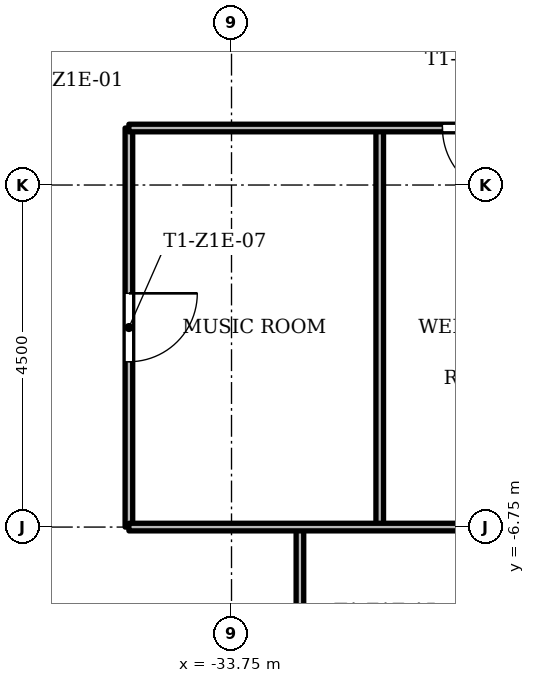
"""IFC4 building model, lengths in metres.
Left out: names, types, materials, properties, quantities, classifications, styles, units other than length and angle.
Written with IfcOpenShell. Run it as: python <this file> out.ifc"""

import sys

from ifc_helpers import new_model, si_unit, direction, frame, frame_2d, origin, place, context, subcontext, project, spatial, rectangle, extrude, element, fill, save


model = new_model("IFC4")
c1 = context("Model", 3, precision=1e-05, world=origin(), true_north=direction((0.0, 1.0)))
c2 = subcontext(c1, "Body", "Model", "MODEL_VIEW")
j1 = project(units=[si_unit("LENGTHUNIT", "METRE"), si_unit("PLANEANGLEUNIT", "RADIAN")], contexts=[c1])
p1 = place(None, origin())
s1 = spatial("IfcSite", under=j1, at=p1, CompositionType="ELEMENT")
p2 = place(p1, origin())
s2 = spatial("IfcBuilding", under=s1, at=p2, CompositionType="ELEMENT")
p3 = place(p2, frame((0.0, 0.0, 65.3)))
s3 = spatial("IfcBuildingStorey", under=s2, at=p3, CompositionType="ELEMENT", Elevation=65.3)
p4 = place(p3, frame((-35.1, -6.75, 0.0), z_axis=(0.0, 0.0, 1.0), x_axis=(0.0, 1.0, 0.0)))
e1 = element("IfcWall", 1, at=p4, inside=s3, PredefinedType="PARTITIONING", context=c2, shape_type="SweptSolid", body=[
    extrude(rectangle(XDim=5.25, YDim=0.1, at=frame_2d((2.625, 0.0))), origin(), (0.0, 0.0, 1.0), 3.0),
])
p5 = place(p4, frame((2.175, 0.0, 0.0)))
e2 = element("IfcOpeningElement", 2, at=p5, cuts=e1, PredefinedType="OPENING", context=c2, shape_type="SweptSolid", body=[
    extrude(rectangle(XDim=0.9, YDim=2.1, at=frame_2d((0.45, 1.05))), frame((0.0, 0.06, 0.0), z_axis=(0.0, -1.0, 0.0), x_axis=(1.0, 0.0, 0.0)), (0.0, 0.0, 1.0), 0.12),
])
p6 = place(p3, frame((-32.85, -15.75, 0.0), z_axis=(0.0, 0.0, 1.0), x_axis=(0.0, 1.0, 0.0)))
e3 = element("IfcWall", 3, at=p6, inside=s3, PredefinedType="PARTITIONING", context=c2, shape_type="SweptSolid", body=[
    extrude(rectangle(XDim=9.0, YDim=0.1, at=frame_2d((4.5, 0.0))), origin(), (0.0, 0.0, 1.0), 3.0),
])
p7 = place(p6, frame((6.3, 0.0, 0.0)))
e4 = element("IfcOpeningElement", 4, at=p7, cuts=e3, PredefinedType="OPENING", context=c2, shape_type="SweptSolid", body=[
    extrude(rectangle(XDim=0.9, YDim=2.1, at=frame_2d((0.45, 1.05))), frame((0.0, 0.06, 0.0), z_axis=(0.0, -1.0, 0.0), x_axis=(1.0, 0.0, 0.0)), (0.0, 0.0, 1.0), 0.12),
])
p8 = place(p6, frame((1.8, 0.0, 0.0)))
e5 = element("IfcOpeningElement", 5, at=p8, cuts=e3, PredefinedType="OPENING", context=c2, shape_type="SweptSolid", body=[
    extrude(rectangle(XDim=0.9, YDim=2.1, at=frame_2d((0.45, 1.05))), frame((0.0, 0.06, 0.0), z_axis=(0.0, -1.0, 0.0), x_axis=(1.0, 0.0, 0.0)), (0.0, 0.0, 1.0), 0.12),
])
p9 = place(p3, frame((-31.8, -6.75, 0.0), z_axis=(0.0, 0.0, 1.0), x_axis=(0.0, 1.0, 0.0)))
e6 = element("IfcWall", 6, at=p9, inside=s3, PredefinedType="PARTITIONING", context=c2, shape_type="SweptSolid", body=[
    extrude(rectangle(XDim=5.25, YDim=0.1, at=frame_2d((2.625, 0.0))), origin(), (0.0, 0.0, 1.0), 3.0),
])
p10 = place(p3, frame((-35.1, -6.75, 0.0), z_axis=(0.0, 0.0, 1.0), x_axis=(1.0, 0.0, 0.0)))
e7 = element("IfcWall", 7, at=p10, inside=s3, PredefinedType="PARTITIONING", context=c2, shape_type="SweptSolid", body=[
    extrude(rectangle(XDim=5.95, YDim=0.1, at=frame_2d((2.975, 0.0))), origin(), (0.0, 0.0, 1.0), 3.0),
])
p11 = place(p3, frame((-35.1, -1.5, 0.0), z_axis=(0.0, 0.0, 1.0), x_axis=(1.0, 0.0, 0.0)))
e8 = element("IfcWall", 8, at=p11, inside=s3, PredefinedType="PARTITIONING", context=c2, shape_type="SweptSolid", body=[
    extrude(rectangle(XDim=5.85, YDim=0.1, at=frame_2d((2.925, 0.0))), origin(), (0.0, 0.0, 1.0), 3.0),
])
p12 = place(p11, frame((4.125, 0.0, 0.0)))
e9 = element("IfcOpeningElement", 9, at=p12, cuts=e8, PredefinedType="OPENING", context=c2, shape_type="SweptSolid", body=[
    extrude(rectangle(XDim=0.9, YDim=2.1, at=frame_2d((0.45, 1.05))), frame((0.0, 0.06, 0.0), z_axis=(0.0, -1.0, 0.0), x_axis=(1.0, 0.0, 0.0)), (0.0, 0.0, 1.0), 0.12),
])
p13 = place(p5, origin())
e10 = element("IfcDoor", 10, at=p13, inside=s3, OperationType="SINGLE_SWING_RIGHT", PredefinedType="DOOR", context=c2, shape_type="SweptSolid", body=[
    extrude(rectangle(XDim=0.9, YDim=2.1, at=frame_2d((0.45, 1.05))), frame((0.0, 0.025, 0.0), z_axis=(0.0, -1.0, 0.0), x_axis=(1.0, 0.0, 0.0)), (0.0, 0.0, 1.0), 0.05),
])
fill(e2, e10)
p14 = place(p12, origin())
e11 = element("IfcDoor", 11, at=p14, inside=s3, OperationType="SINGLE_SWING_RIGHT", PredefinedType="DOOR", context=c2, shape_type="SweptSolid", body=[
    extrude(rectangle(XDim=0.9, YDim=2.1, at=frame_2d((0.45, 1.05))), frame((0.0, 0.025, 0.0), z_axis=(0.0, -1.0, 0.0), x_axis=(1.0, 0.0, 0.0)), (0.0, 0.0, 1.0), 0.05),
])
fill(e9, e11)
save(model, sys.argv[1])
